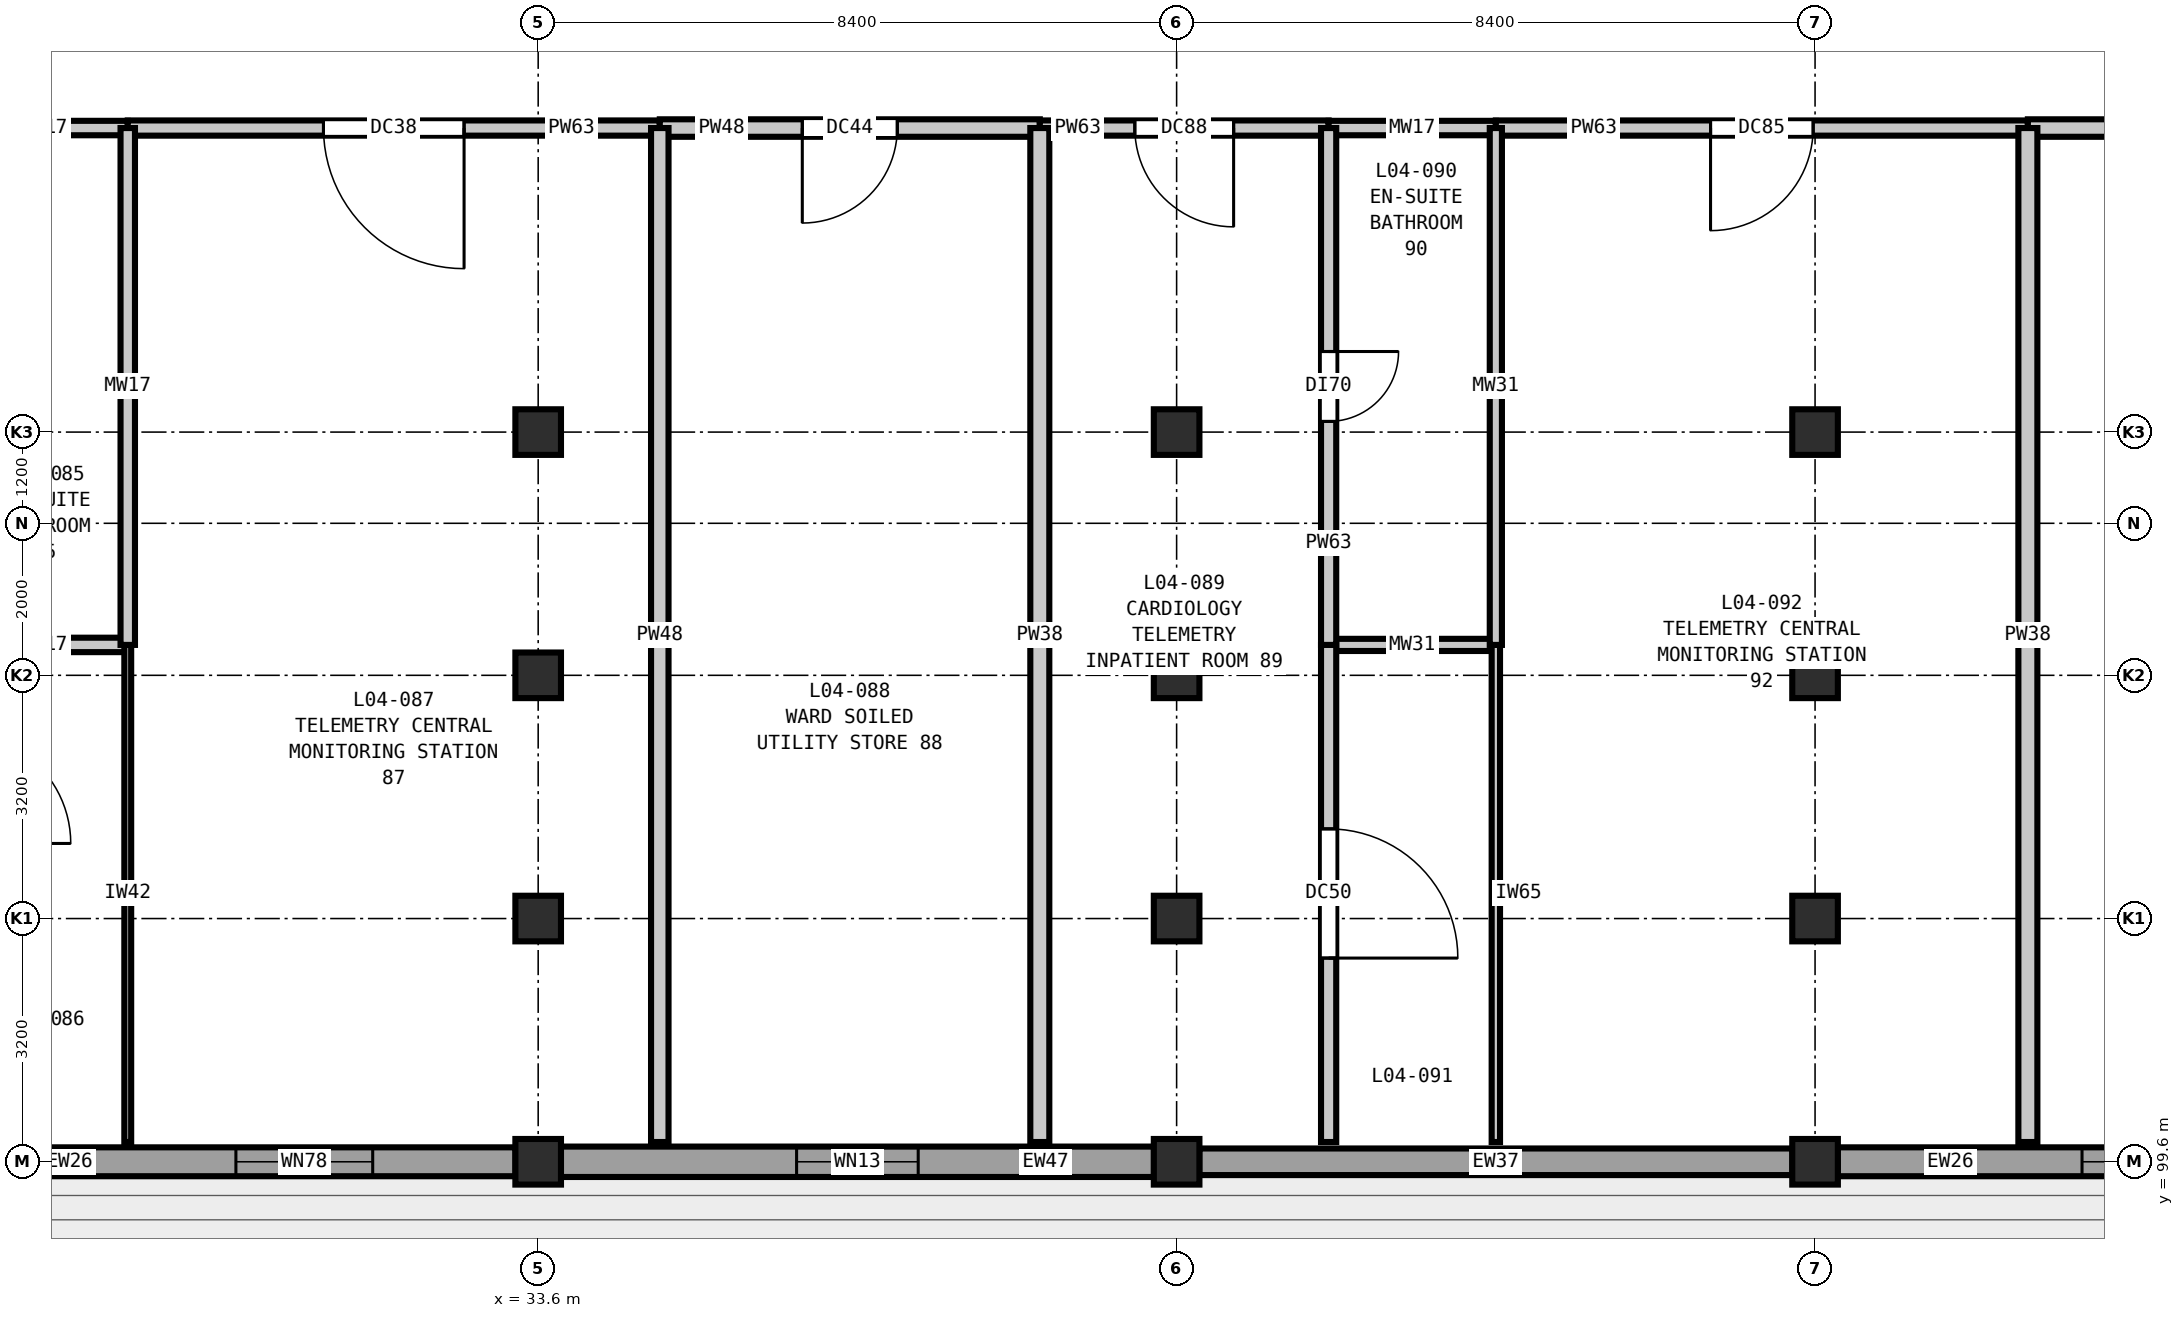
"""IFC4 building model, lengths in metres.
Left out: names, types, materials, properties, quantities, classifications, styles, units other than length and angle.
Written with IfcOpenShell. Run it as: python <this file> out.ifc"""

import sys

from ifc_helpers import new_model, si_unit, direction, frame, frame_2d, origin, origin_2d, place, context, subcontext, project, spatial, rectangle, extrude, element, fill, save


model = new_model("IFC4")
c1 = context("Model", 3, precision=1e-05, world=origin(), true_north=direction((0.0, 1.0)))
c2 = subcontext(c1, "Body", "Model", "MODEL_VIEW")
j1 = project(units=[si_unit("LENGTHUNIT", "METRE"), si_unit("PLANEANGLEUNIT", "RADIAN")], contexts=[c1])
p1 = place(None, origin())
s1 = spatial("IfcSite", under=j1, at=p1, CompositionType="ELEMENT")
p2 = place(p1, origin())
s2 = spatial("IfcBuilding", under=s1, at=p2, CompositionType="ELEMENT")
p3 = place(p2, frame((0.0, 0.0, 20.4)))
s3 = spatial("IfcBuildingStorey", under=s2, at=p3, CompositionType="ELEMENT", Elevation=20.4)
for number, where, z_axis, x_axis in (
    (1, (33.6, 99.6, 0.0), (0.0, 0.0, 1.0), (1.0, 0.0, 0.0)),
    (2, (33.6, 102.8, 0.0), (0.0, 0.0, 1.0), (1.0, 0.0, 0.0)),
    (3, (33.6, 106.0, 0.0), (0.0, 0.0, 1.0), (1.0, 0.0, 0.0)),
    (4, (33.6, 109.2, 0.0), (0.0, 0.0, 1.0), (1.0, 0.0, 0.0)),
    (5, (42.0, 99.6, 0.0), (0.0, 0.0, 1.0), (1.0, 0.0, 0.0)),
    (6, (42.0, 102.8, 0.0), (0.0, 0.0, 1.0), (1.0, 0.0, 0.0)),
    (7, (42.0, 106.0, 0.0), (0.0, 0.0, 1.0), (1.0, 0.0, 0.0)),
    (8, (42.0, 109.2, 0.0), (0.0, 0.0, 1.0), (1.0, 0.0, 0.0)),
    (9, (50.4, 99.6, 0.0), (0.0, 0.0, 1.0), (1.0, 0.0, 0.0)),
    (10, (50.4, 102.8, 0.0), (0.0, 0.0, 1.0), (1.0, 0.0, 0.0)),
    (11, (50.4, 106.0, 0.0), (0.0, 0.0, 1.0), (1.0, 0.0, 0.0)),
    (12, (50.4, 109.2, 0.0), (0.0, 0.0, 1.0), (1.0, 0.0, 0.0)),
):
    element("IfcColumn", number, at=place(p3, frame(where, z_axis=z_axis, x_axis=x_axis)), inside=s3, PredefinedType="COLUMN", context=c2, shape_type="SweptSolid", body=[
        extrude(rectangle(XDim=0.6, YDim=0.6, at=origin_2d()), origin(), (0.0, 0.0, 1.0), 4.2),
    ])
p4 = place(p3, frame((58.527, 99.6, 0.0), z_axis=(0.0, 0.0, 1.0), x_axis=(-1.0, 0.0, 0.0)))
e13 = element("IfcWall", 13, at=p4, inside=s3, PredefinedType="SOLIDWALL", context=c2, shape_type="SweptSolid", body=[
    extrude(rectangle(XDim=7.829, YDim=0.38, at=frame_2d((3.915, 0.0))), origin(), (0.0, 0.0, 1.0), 3.48),
])
p5 = place(p4, frame((3.215, 0.0, 0.9)))
e14 = element("IfcOpeningElement", 14, at=p5, cuts=e13, PredefinedType="OPENING", context=c2, shape_type="SweptSolid", body=[
    extrude(rectangle(XDim=1.4, YDim=1.95, at=frame_2d((0.7, 0.975))), frame((0.0, 0.2, 0.0), z_axis=(0.0, -1.0, 0.0), x_axis=(1.0, 0.0, 0.0)), (0.0, 0.0, 1.0), 0.4),
])
p6 = place(p3, frame((50.102, 99.6, 0.0), z_axis=(0.0, 0.0, 1.0), x_axis=(-1.0, 0.0, 0.0)))
e15 = element("IfcWall", 15, at=p6, inside=s3, PredefinedType="SOLIDWALL", context=c2, shape_type="SweptSolid", body=[
    extrude(rectangle(XDim=7.804, YDim=0.35, at=frame_2d((3.902, 0.0))), origin(), (0.0, 0.0, 1.0), 3.48),
])
p7 = place(p3, frame((41.702, 99.6, 0.0), z_axis=(0.0, 0.0, 1.0), x_axis=(-1.0, 0.0, 0.0)))
e16 = element("IfcWall", 16, at=p7, inside=s3, PredefinedType="SOLIDWALL", context=c2, shape_type="SweptSolid", body=[
    extrude(rectangle(XDim=7.804, YDim=0.4, at=frame_2d((3.902, 0.0))), origin(), (0.0, 0.0, 1.0), 3.48),
])
p8 = place(p7, frame((3.102, 0.0, 0.9)))
e17 = element("IfcOpeningElement", 17, at=p8, cuts=e16, PredefinedType="OPENING", context=c2, shape_type="SweptSolid", body=[
    extrude(rectangle(XDim=1.6, YDim=1.95, at=frame_2d((0.8, 0.975))), frame((0.0, 0.21, 0.0), z_axis=(0.0, -1.0, 0.0), x_axis=(1.0, 0.0, 0.0)), (0.0, 0.0, 1.0), 0.42),
])
p9 = place(p3, frame((33.302, 99.6, 0.0), z_axis=(0.0, 0.0, 1.0), x_axis=(-1.0, 0.0, 0.0)))
e18 = element("IfcWall", 18, at=p9, inside=s3, PredefinedType="SOLIDWALL", context=c2, shape_type="SweptSolid", body=[
    extrude(rectangle(XDim=7.804, YDim=0.38, at=frame_2d((3.902, 0.0))), origin(), (0.0, 0.0, 1.0), 3.48),
])
p10 = place(p9, frame((1.879, 0.0, 0.9)))
e19 = element("IfcOpeningElement", 19, at=p10, cuts=e18, PredefinedType="OPENING", context=c2, shape_type="SweptSolid", body=[
    extrude(rectangle(XDim=1.8, YDim=1.95, at=frame_2d((0.9, 0.975))), frame((0.0, 0.2, 0.0), z_axis=(0.0, -1.0, 0.0), x_axis=(1.0, 0.0, 0.0)), (0.0, 0.0, 1.0), 0.4),
])
p11 = place(p3, frame((26.0, 106.4, 0.0), z_axis=(0.0, 0.0, 1.0), x_axis=(1.0, 0.0, 0.0)))
e20 = element("IfcWall", 20, at=p11, inside=s3, PredefinedType="PLUMBINGWALL", context=c2, shape_type="SweptSolid", body=[
    extrude(rectangle(XDim=2.2, YDim=0.19, at=frame_2d((1.1, 0.0))), origin(), (0.0, 0.0, 1.0), 3.82),
])
p12 = place(p3, frame((44.0, 106.4, 0.0), z_axis=(0.0, 0.0, 1.0), x_axis=(1.0, 0.0, 0.0)))
e21 = element("IfcWall", 21, at=p12, inside=s3, PredefinedType="PLUMBINGWALL", context=c2, shape_type="SweptSolid", body=[
    extrude(rectangle(XDim=2.2, YDim=0.16, at=frame_2d((1.1, 0.0))), origin(), (0.0, 0.0, 1.0), 3.82),
])
p13 = place(p3, frame((26.0, 113.2, 0.0), z_axis=(0.0, 0.0, 1.0), x_axis=(1.0, 0.0, 0.0)))
e22 = element("IfcWall", 22, at=p13, inside=s3, PredefinedType="PLUMBINGWALL", context=c2, shape_type="SweptSolid", body=[
    extrude(rectangle(XDim=2.2, YDim=0.19, at=frame_2d((1.1, 0.0))), origin(), (0.0, 0.0, 1.0), 3.82),
])
p14 = place(p3, frame((28.2, 113.2, 0.0), z_axis=(0.0, 0.0, 1.0), x_axis=(1.0, 0.0, 0.0)))
e23 = element("IfcWall", 23, at=p14, inside=s3, PredefinedType="PARTITIONING", context=c2, shape_type="SweptSolid", body=[
    extrude(rectangle(XDim=7.0, YDim=0.2, at=frame_2d((3.5, 0.0))), origin(), (0.0, 0.0, 1.0), 3.82),
])
p15 = place(p14, frame((2.575, 0.0, 0.0)))
e24 = element("IfcOpeningElement", 24, at=p15, cuts=e23, PredefinedType="OPENING", context=c2, shape_type="SweptSolid", body=[
    extrude(rectangle(XDim=1.85, YDim=2.3, at=frame_2d((0.925, 1.15))), frame((0.0, 0.11, 0.0), z_axis=(0.0, -1.0, 0.0), x_axis=(1.0, 0.0, 0.0)), (0.0, 0.0, 1.0), 0.22),
])
p16 = place(p3, frame((35.2, 113.2, 0.0), z_axis=(0.0, 0.0, 1.0), x_axis=(1.0, 0.0, 0.0)))
e25 = element("IfcWall", 25, at=p16, inside=s3, PredefinedType="PARTITIONING", context=c2, shape_type="SweptSolid", body=[
    extrude(rectangle(XDim=5.0, YDim=0.23, at=frame_2d((2.5, 0.0))), origin(), (0.0, 0.0, 1.0), 3.82),
])
p17 = place(p16, frame((1.875, 0.0, 0.0)))
e26 = element("IfcOpeningElement", 26, at=p17, cuts=e25, PredefinedType="OPENING", context=c2, shape_type="SweptSolid", body=[
    extrude(rectangle(XDim=1.25, YDim=2.15, at=frame_2d((0.625, 1.075))), frame((0.0, 0.125, 0.0), z_axis=(0.0, -1.0, 0.0), x_axis=(1.0, 0.0, 0.0)), (0.0, 0.0, 1.0), 0.25),
])
p18 = place(p3, frame((40.2, 113.2, 0.0), z_axis=(0.0, 0.0, 1.0), x_axis=(1.0, 0.0, 0.0)))
e27 = element("IfcWall", 27, at=p18, inside=s3, PredefinedType="PARTITIONING", context=c2, shape_type="SweptSolid", body=[
    extrude(rectangle(XDim=3.8, YDim=0.2, at=frame_2d((1.9, 0.0))), origin(), (0.0, 0.0, 1.0), 3.82),
])
p19 = place(p18, frame((1.25, 0.0, 0.0)))
e28 = element("IfcOpeningElement", 28, at=p19, cuts=e27, PredefinedType="OPENING", context=c2, shape_type="SweptSolid", body=[
    extrude(rectangle(XDim=1.3, YDim=2.2, at=frame_2d((0.65, 1.1))), frame((0.0, 0.11, 0.0), z_axis=(0.0, -1.0, 0.0), x_axis=(1.0, 0.0, 0.0)), (0.0, 0.0, 1.0), 0.22),
])
p20 = place(p3, frame((44.0, 113.2, 0.0), z_axis=(0.0, 0.0, 1.0), x_axis=(1.0, 0.0, 0.0)))
e29 = element("IfcWall", 29, at=p20, inside=s3, PredefinedType="PLUMBINGWALL", context=c2, shape_type="SweptSolid", body=[
    extrude(rectangle(XDim=2.2, YDim=0.19, at=frame_2d((1.1, 0.0))), origin(), (0.0, 0.0, 1.0), 3.82),
])
p21 = place(p3, frame((46.2, 113.2, 0.0), z_axis=(0.0, 0.0, 1.0), x_axis=(1.0, 0.0, 0.0)))
e30 = element("IfcWall", 30, at=p21, inside=s3, PredefinedType="PARTITIONING", context=c2, shape_type="SweptSolid", body=[
    extrude(rectangle(XDim=7.0, YDim=0.2, at=frame_2d((3.5, 0.0))), origin(), (0.0, 0.0, 1.0), 3.82),
])
p22 = place(p21, frame((2.825, 0.0, 0.0)))
e31 = element("IfcOpeningElement", 31, at=p22, cuts=e30, PredefinedType="OPENING", context=c2, shape_type="SweptSolid", body=[
    extrude(rectangle(XDim=1.35, YDim=2.2, at=frame_2d((0.675, 1.1))), frame((0.0, 0.11, 0.0), z_axis=(0.0, -1.0, 0.0), x_axis=(1.0, 0.0, 0.0)), (0.0, 0.0, 1.0), 0.22),
])
p23 = place(p3, frame((53.2, 113.2, 0.0), z_axis=(0.0, 0.0, 1.0), x_axis=(1.0, 0.0, 0.0)))
e32 = element("IfcWall", 32, at=p23, inside=s3, PredefinedType="PARTITIONING", context=c2, shape_type="SweptSolid", body=[
    extrude(rectangle(XDim=5.0, YDim=0.23, at=frame_2d((2.5, 0.0))), origin(), (0.0, 0.0, 1.0), 3.82),
])
p24 = place(p23, frame((1.775, 0.0, 0.0)))
e33 = element("IfcOpeningElement", 33, at=p24, cuts=e32, PredefinedType="OPENING", context=c2, shape_type="SweptSolid", body=[
    extrude(rectangle(XDim=1.45, YDim=2.25, at=frame_2d((0.725, 1.125))), frame((0.0, 0.125, 0.0), z_axis=(0.0, -1.0, 0.0), x_axis=(1.0, 0.0, 0.0)), (0.0, 0.0, 1.0), 0.25),
])
p25 = place(p3, frame((28.2, 99.86, 0.0), z_axis=(0.0, 0.0, 1.0), x_axis=(0.0, 1.0, 0.0)))
e34 = element("IfcWall", 34, at=p25, inside=s3, PredefinedType="PARTITIONING", context=c2, shape_type="SweptSolid", body=[
    extrude(rectangle(XDim=6.54, YDim=0.09, at=frame_2d((3.27, 0.0))), origin(), (0.0, 0.0, 1.0), 3.82),
])
p26 = place(p3, frame((28.2, 106.4, 0.0), z_axis=(0.0, 0.0, 1.0), x_axis=(0.0, 1.0, 0.0)))
e35 = element("IfcWall", 35, at=p26, inside=s3, PredefinedType="PLUMBINGWALL", context=c2, shape_type="SweptSolid", body=[
    extrude(rectangle(XDim=6.8, YDim=0.19, at=frame_2d((3.4, 0.0))), origin(), (0.0, 0.0, 1.0), 3.82),
])
p27 = place(p3, frame((35.2, 99.86, 0.0), z_axis=(0.0, 0.0, 1.0), x_axis=(0.0, 1.0, 0.0)))
e36 = element("IfcWall", 36, at=p27, inside=s3, PredefinedType="PARTITIONING", context=c2, shape_type="SweptSolid", body=[
    extrude(rectangle(XDim=13.34, YDim=0.23, at=frame_2d((6.67, 0.0))), origin(), (0.0, 0.0, 1.0), 3.82),
])
p28 = place(p3, frame((40.2, 99.86, 0.0), z_axis=(0.0, 0.0, 1.0), x_axis=(0.0, 1.0, 0.0)))
e37 = element("IfcWall", 37, at=p28, inside=s3, PredefinedType="PARTITIONING", context=c2, shape_type="SweptSolid", body=[
    extrude(rectangle(XDim=13.34, YDim=0.25, at=frame_2d((6.67, 0.0))), origin(), (0.0, 0.0, 1.0), 3.82),
])
p29 = place(p3, frame((44.0, 99.86, 0.0), z_axis=(0.0, 0.0, 1.0), x_axis=(0.0, 1.0, 0.0)))
e38 = element("IfcWall", 38, at=p29, inside=s3, PredefinedType="PARTITIONING", context=c2, shape_type="SweptSolid", body=[
    extrude(rectangle(XDim=6.54, YDim=0.2, at=frame_2d((3.27, 0.0))), origin(), (0.0, 0.0, 1.0), 3.82),
])
p30 = place(p29, frame((2.42, 0.0, 0.0)))
e39 = element("IfcOpeningElement", 39, at=p30, cuts=e38, PredefinedType="OPENING", context=c2, shape_type="SweptSolid", body=[
    extrude(rectangle(XDim=1.7, YDim=2.3, at=frame_2d((0.85, 1.15))), frame((0.0, 0.11, 0.0), z_axis=(0.0, -1.0, 0.0), x_axis=(1.0, 0.0, 0.0)), (0.0, 0.0, 1.0), 0.22),
])
p31 = place(p3, frame((44.0, 106.4, 0.0), z_axis=(0.0, 0.0, 1.0), x_axis=(0.0, 1.0, 0.0)))
e40 = element("IfcWall", 40, at=p31, inside=s3, PredefinedType="PARTITIONING", context=c2, shape_type="SweptSolid", body=[
    extrude(rectangle(XDim=6.8, YDim=0.2, at=frame_2d((3.4, 0.0))), origin(), (0.0, 0.0, 1.0), 3.82),
])
p32 = place(p31, frame((2.94, 0.0, 0.0)))
e41 = element("IfcOpeningElement", 41, at=p32, cuts=e40, PredefinedType="OPENING", context=c2, shape_type="SweptSolid", body=[
    extrude(rectangle(XDim=0.92, YDim=2.1, at=frame_2d((0.46, 1.05))), frame((0.0, 0.11, 0.0), z_axis=(0.0, -1.0, 0.0), x_axis=(1.0, 0.0, 0.0)), (0.0, 0.0, 1.0), 0.22),
])
p33 = place(p3, frame((46.2, 99.86, 0.0), z_axis=(0.0, 0.0, 1.0), x_axis=(0.0, 1.0, 0.0)))
e42 = element("IfcWall", 42, at=p33, inside=s3, PredefinedType="PARTITIONING", context=c2, shape_type="SweptSolid", body=[
    extrude(rectangle(XDim=6.54, YDim=0.11, at=frame_2d((3.27, 0.0))), origin(), (0.0, 0.0, 1.0), 3.82),
])
p34 = place(p3, frame((46.2, 106.4, 0.0), z_axis=(0.0, 0.0, 1.0), x_axis=(0.0, 1.0, 0.0)))
e43 = element("IfcWall", 43, at=p34, inside=s3, PredefinedType="PLUMBINGWALL", context=c2, shape_type="SweptSolid", body=[
    extrude(rectangle(XDim=6.8, YDim=0.16, at=frame_2d((3.4, 0.0))), origin(), (0.0, 0.0, 1.0), 3.82),
])
p35 = place(p3, frame((53.2, 99.86, 0.0), z_axis=(0.0, 0.0, 1.0), x_axis=(0.0, 1.0, 0.0)))
e44 = element("IfcWall", 44, at=p35, inside=s3, PredefinedType="PARTITIONING", context=c2, shape_type="SweptSolid", body=[
    extrude(rectangle(XDim=13.34, YDim=0.25, at=frame_2d((6.67, 0.0))), origin(), (0.0, 0.0, 1.0), 3.82),
])
p36 = place(p5, origin())
e45 = element("IfcWindow", 45, at=p36, inside=s3, PartitioningType="SINGLE_PANEL", PredefinedType="WINDOW", context=c2, shape_type="SweptSolid", body=[
    extrude(rectangle(XDim=1.4, YDim=1.95, at=frame_2d((0.7, 0.975))), frame((0.0, 0.03, 0.0), z_axis=(0.0, -1.0, 0.0), x_axis=(1.0, 0.0, 0.0)), (0.0, 0.0, 1.0), 0.06),
])
fill(e14, e45)
p37 = place(p8, origin())
e46 = element("IfcWindow", 46, at=p37, inside=s3, PartitioningType="DOUBLE_PANEL_VERTICAL", PredefinedType="WINDOW", context=c2, shape_type="SweptSolid", body=[
    extrude(rectangle(XDim=1.6, YDim=1.95, at=frame_2d((0.8, 0.975))), frame((0.0, 0.03, 0.0), z_axis=(0.0, -1.0, 0.0), x_axis=(1.0, 0.0, 0.0)), (0.0, 0.0, 1.0), 0.06),
])
fill(e17, e46)
p38 = place(p10, origin())
e47 = element("IfcWindow", 47, at=p38, inside=s3, PartitioningType="DOUBLE_PANEL_VERTICAL", PredefinedType="WINDOW", context=c2, shape_type="SweptSolid", body=[
    extrude(rectangle(XDim=1.8, YDim=1.95, at=frame_2d((0.9, 0.975))), frame((0.0, 0.03, 0.0), z_axis=(0.0, -1.0, 0.0), x_axis=(1.0, 0.0, 0.0)), (0.0, 0.0, 1.0), 0.06),
])
fill(e19, e47)
p39 = place(p15, frame((1.85, 0.0, 0.0), z_axis=(0.0, 0.0, 1.0), x_axis=(-1.0, 0.0, 0.0)))
e48 = element("IfcDoor", 48, at=p39, inside=s3, OperationType="SINGLE_SWING_LEFT", PredefinedType="DOOR", context=c2, shape_type="SweptSolid", body=[
    extrude(rectangle(XDim=1.85, YDim=2.3, at=frame_2d((0.925, 1.15))), frame((0.0, 0.025, 0.0), z_axis=(0.0, -1.0, 0.0), x_axis=(1.0, 0.0, 0.0)), (0.0, 0.0, 1.0), 0.05),
])
fill(e24, e48)
p40 = place(p17, frame((1.25, 0.0, 0.0), z_axis=(0.0, 0.0, 1.0), x_axis=(-1.0, 0.0, 0.0)))
e49 = element("IfcDoor", 49, at=p40, inside=s3, OperationType="SINGLE_SWING_RIGHT", PredefinedType="DOOR", context=c2, shape_type="SweptSolid", body=[
    extrude(rectangle(XDim=1.25, YDim=2.15, at=frame_2d((0.625, 1.075))), frame((0.0, 0.025, 0.0), z_axis=(0.0, -1.0, 0.0), x_axis=(1.0, 0.0, 0.0)), (0.0, 0.0, 1.0), 0.05),
])
fill(e26, e49)
p41 = place(p19, frame((1.3, 0.0, 0.0), z_axis=(0.0, 0.0, 1.0), x_axis=(-1.0, 0.0, 0.0)))
e50 = element("IfcDoor", 50, at=p41, inside=s3, OperationType="SINGLE_SWING_LEFT", PredefinedType="DOOR", context=c2, shape_type="SweptSolid", body=[
    extrude(rectangle(XDim=1.3, YDim=2.2, at=frame_2d((0.65, 1.1))), frame((0.0, 0.025, 0.0), z_axis=(0.0, -1.0, 0.0), x_axis=(1.0, 0.0, 0.0)), (0.0, 0.0, 1.0), 0.05),
])
fill(e28, e50)
p42 = place(p22, frame((1.35, 0.0, 0.0), z_axis=(0.0, 0.0, 1.0), x_axis=(-1.0, 0.0, 0.0)))
e51 = element("IfcDoor", 51, at=p42, inside=s3, OperationType="SINGLE_SWING_RIGHT", PredefinedType="DOOR", context=c2, shape_type="SweptSolid", body=[
    extrude(rectangle(XDim=1.35, YDim=2.2, at=frame_2d((0.675, 1.1))), frame((0.0, 0.025, 0.0), z_axis=(0.0, -1.0, 0.0), x_axis=(1.0, 0.0, 0.0)), (0.0, 0.0, 1.0), 0.05),
])
fill(e31, e51)
p43 = place(p30, frame((1.7, 0.0, 0.0), z_axis=(0.0, 0.0, 1.0), x_axis=(-1.0, 0.0, 0.0)))
e52 = element("IfcDoor", 52, at=p43, inside=s3, OperationType="SINGLE_SWING_RIGHT", PredefinedType="DOOR", context=c2, shape_type="SweptSolid", body=[
    extrude(rectangle(XDim=1.7, YDim=2.3, at=frame_2d((0.85, 1.15))), frame((0.0, 0.025, 0.0), z_axis=(0.0, -1.0, 0.0), x_axis=(1.0, 0.0, 0.0)), (0.0, 0.0, 1.0), 0.05),
])
fill(e39, e52)
p44 = place(p32, frame((0.92, 0.0, 0.0), z_axis=(0.0, 0.0, 1.0), x_axis=(-1.0, 0.0, 0.0)))
e53 = element("IfcDoor", 53, at=p44, inside=s3, OperationType="SINGLE_SWING_LEFT", PredefinedType="DOOR", context=c2, shape_type="SweptSolid", body=[
    extrude(rectangle(XDim=0.92, YDim=2.1, at=frame_2d((0.46, 1.05))), frame((0.0, 0.025, 0.0), z_axis=(0.0, -1.0, 0.0), x_axis=(1.0, 0.0, 0.0)), (0.0, 0.0, 1.0), 0.05),
])
fill(e41, e53)
save(model, sys.argv[1])
